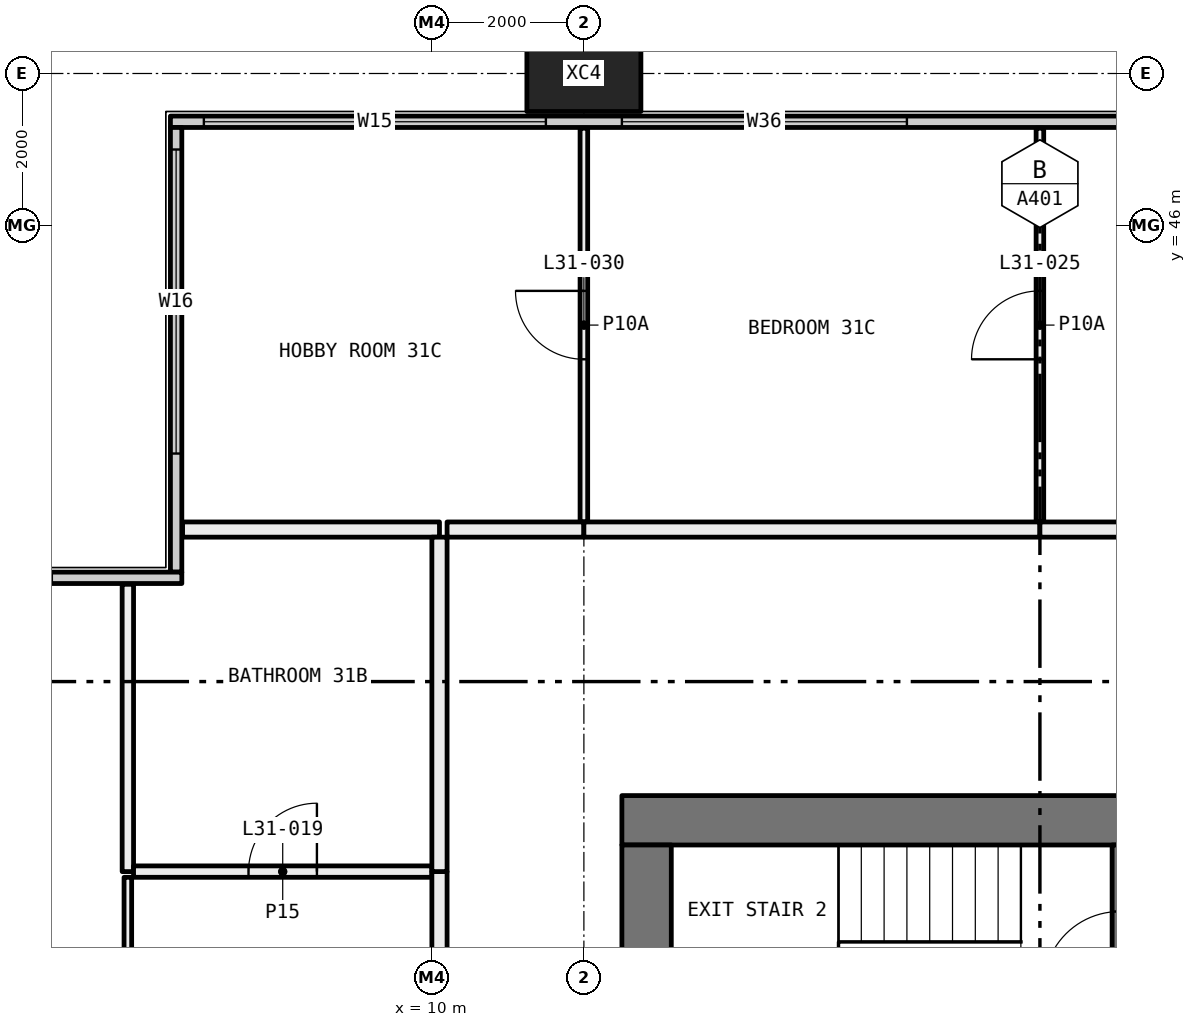
"""IFC4 building model, lengths in metres.
Left out: names, types, materials, properties, quantities, classifications, styles, units other than length and angle.
Written with IfcOpenShell. Run it as: python <this file> out.ifc"""

import sys

from ifc_helpers import new_model, si_unit, direction, frame, frame_2d, origin, origin_2d, place, context, subcontext, project, spatial, rectangle, hollow_rectangle, extrude, element, fill, save


model = new_model("IFC4")
c1 = context("Model", 3, precision=1e-05, world=origin(), true_north=direction((0.0, 1.0)))
c2 = subcontext(c1, "Body", "Model", "MODEL_VIEW")
j1 = project(units=[si_unit("LENGTHUNIT", "METRE"), si_unit("PLANEANGLEUNIT", "RADIAN")], contexts=[c1])
p1 = place(None, origin())
s1 = spatial("IfcSite", under=j1, at=p1, CompositionType="ELEMENT")
p2 = place(p1, origin())
s2 = spatial("IfcBuilding", under=s1, at=p2, CompositionType="ELEMENT")
p3 = place(p2, frame((0.0, 0.0, 120.75)))
s3 = spatial("IfcBuildingStorey", under=s2, at=p3, CompositionType="ELEMENT", Elevation=120.75)
p4 = place(p3, frame((12.0, 48.0, -0.4), z_axis=(0.0, 0.0, 1.0), x_axis=(1.0, 0.0, 0.0)))
e1 = element("IfcColumn", 1, at=p4, inside=s3, PredefinedType="COLUMN", context=c2, shape_type="SweptSolid", body=[
    extrude(hollow_rectangle(XDim=1.5, YDim=1.0, WallThickness=0.06, at=origin_2d()), origin(), (0.0, 0.0, 1.0), 3.45),
])
p5 = place(p3, frame((6.56, 47.365, 0.0), z_axis=(0.0, 0.0, 1.0), x_axis=(1.0, 0.0, 0.0)))
e2 = element("IfcWall", 2, at=p5, inside=s3, PredefinedType="ELEMENTEDWALL", context=c2, shape_type="SweptSolid", body=[
    extrude(rectangle(XDim=58.88, YDim=0.15, at=frame_2d((29.44, 0.0))), origin(), (0.0, 0.0, 1.0), 3.05),
])
p6 = place(p5, frame((0.44, 0.0, 0.45)))
e3 = element("IfcOpeningElement", 3, at=p6, cuts=e2, PredefinedType="OPENING", context=c2, shape_type="SweptSolid", body=[
    extrude(rectangle(XDim=4.5, YDim=2.55, at=frame_2d((2.25, 1.275))), frame((0.0, 0.085, 0.0), z_axis=(0.0, -1.0, 0.0), x_axis=(1.0, 0.0, 0.0)), (0.0, 0.0, 1.0), 0.17),
])
p7 = place(p5, frame((5.94, 0.0, 0.45)))
e4 = element("IfcOpeningElement", 4, at=p7, cuts=e2, PredefinedType="OPENING", context=c2, shape_type="SweptSolid", body=[
    extrude(rectangle(XDim=3.75, YDim=2.55, at=frame_2d((1.875, 1.275))), frame((0.0, 0.085, 0.0), z_axis=(0.0, -1.0, 0.0), x_axis=(1.0, 0.0, 0.0)), (0.0, 0.0, 1.0), 0.17),
])
p8 = place(p5, frame((13.19, 0.0, 0.45)))
e5 = element("IfcOpeningElement", 5, at=p8, cuts=e2, PredefinedType="OPENING", context=c2, shape_type="SweptSolid", body=[
    extrude(rectangle(XDim=3.75, YDim=2.55, at=frame_2d((1.875, 1.275))), frame((0.0, 0.085, 0.0), z_axis=(0.0, -1.0, 0.0), x_axis=(1.0, 0.0, 0.0)), (0.0, 0.0, 1.0), 0.17),
])
p9 = place(p5, frame((17.94, 0.0, 0.45)))
e6 = element("IfcOpeningElement", 6, at=p9, cuts=e2, PredefinedType="OPENING", context=c2, shape_type="SweptSolid", body=[
    extrude(rectangle(XDim=3.75, YDim=2.55, at=frame_2d((1.875, 1.275))), frame((0.0, 0.085, 0.0), z_axis=(0.0, -1.0, 0.0), x_axis=(1.0, 0.0, 0.0)), (0.0, 0.0, 1.0), 0.17),
])
p10 = place(p5, frame((25.19, 0.0, 0.45)))
e7 = element("IfcOpeningElement", 7, at=p10, cuts=e2, PredefinedType="OPENING", context=c2, shape_type="SweptSolid", body=[
    extrude(rectangle(XDim=0.75, YDim=2.55, at=frame_2d((0.375, 1.275))), frame((0.0, 0.085, 0.0), z_axis=(0.0, -1.0, 0.0), x_axis=(1.0, 0.0, 0.0)), (0.0, 0.0, 1.0), 0.17),
])
p11 = place(p5, frame((26.94, 0.0, 0.45)))
e8 = element("IfcOpeningElement", 8, at=p11, cuts=e2, PredefinedType="OPENING", context=c2, shape_type="SweptSolid", body=[
    extrude(rectangle(XDim=2.0, YDim=2.55, at=frame_2d((1.0, 1.275))), frame((0.0, 0.085, 0.0), z_axis=(0.0, -1.0, 0.0), x_axis=(1.0, 0.0, 0.0)), (0.0, 0.0, 1.0), 0.17),
])
p12 = place(p5, frame((29.94, 0.0, 0.45)))
e9 = element("IfcOpeningElement", 9, at=p12, cuts=e2, PredefinedType="OPENING", context=c2, shape_type="SweptSolid", body=[
    extrude(rectangle(XDim=3.75, YDim=2.55, at=frame_2d((1.875, 1.275))), frame((0.0, 0.085, 0.0), z_axis=(0.0, -1.0, 0.0), x_axis=(1.0, 0.0, 0.0)), (0.0, 0.0, 1.0), 0.17),
])
p13 = place(p5, frame((37.19, 0.0, 0.45)))
e10 = element("IfcOpeningElement", 10, at=p13, cuts=e2, PredefinedType="OPENING", context=c2, shape_type="SweptSolid", body=[
    extrude(rectangle(XDim=3.75, YDim=2.55, at=frame_2d((1.875, 1.275))), frame((0.0, 0.085, 0.0), z_axis=(0.0, -1.0, 0.0), x_axis=(1.0, 0.0, 0.0)), (0.0, 0.0, 1.0), 0.17),
])
p14 = place(p5, frame((41.94, 0.0, 0.45)))
e11 = element("IfcOpeningElement", 11, at=p14, cuts=e2, PredefinedType="OPENING", context=c2, shape_type="SweptSolid", body=[
    extrude(rectangle(XDim=3.75, YDim=2.55, at=frame_2d((1.875, 1.275))), frame((0.0, 0.085, 0.0), z_axis=(0.0, -1.0, 0.0), x_axis=(1.0, 0.0, 0.0)), (0.0, 0.0, 1.0), 0.17),
])
p15 = place(p5, frame((49.19, 0.0, 0.45)))
e12 = element("IfcOpeningElement", 12, at=p15, cuts=e2, PredefinedType="OPENING", context=c2, shape_type="SweptSolid", body=[
    extrude(rectangle(XDim=0.75, YDim=2.55, at=frame_2d((0.375, 1.275))), frame((0.0, 0.085, 0.0), z_axis=(0.0, -1.0, 0.0), x_axis=(1.0, 0.0, 0.0)), (0.0, 0.0, 1.0), 0.17),
])
p16 = place(p5, frame((50.94, 0.0, 0.45)))
e13 = element("IfcOpeningElement", 13, at=p16, cuts=e2, PredefinedType="OPENING", context=c2, shape_type="SweptSolid", body=[
    extrude(rectangle(XDim=2.0, YDim=2.55, at=frame_2d((1.0, 1.275))), frame((0.0, 0.085, 0.0), z_axis=(0.0, -1.0, 0.0), x_axis=(1.0, 0.0, 0.0)), (0.0, 0.0, 1.0), 0.17),
])
p17 = place(p5, frame((53.94, 0.0, 0.45)))
e14 = element("IfcOpeningElement", 14, at=p17, cuts=e2, PredefinedType="OPENING", context=c2, shape_type="SweptSolid", body=[
    extrude(rectangle(XDim=4.5, YDim=2.55, at=frame_2d((2.25, 1.275))), frame((0.0, 0.085, 0.0), z_axis=(0.0, -1.0, 0.0), x_axis=(1.0, 0.0, 0.0)), (0.0, 0.0, 1.0), 0.17),
])
p18 = place(p3, frame((6.635, 41.44, 0.0), z_axis=(0.0, 0.0, 1.0), x_axis=(0.0, 1.0, 0.0)))
e15 = element("IfcWall", 15, at=p18, inside=s3, PredefinedType="ELEMENTEDWALL", context=c2, shape_type="SweptSolid", body=[
    extrude(rectangle(XDim=5.85, YDim=0.15, at=frame_2d((2.925, 0.0))), origin(), (0.0, 0.0, 1.0), 3.05),
])
p19 = place(p18, frame((1.56, 0.0, 0.45)))
e16 = element("IfcOpeningElement", 16, at=p19, cuts=e15, PredefinedType="OPENING", context=c2, shape_type="SweptSolid", body=[
    extrude(rectangle(XDim=4.0, YDim=2.55, at=frame_2d((2.0, 1.275))), frame((0.0, 0.085, 0.0), z_axis=(0.0, -1.0, 0.0), x_axis=(1.0, 0.0, 0.0)), (0.0, 0.0, 1.0), 0.17),
])
p20 = place(p3, frame((0.56, 41.365, 0.0), z_axis=(0.0, 0.0, 1.0), x_axis=(1.0, 0.0, 0.0)))
e17 = element("IfcWall", 17, at=p20, inside=s3, PredefinedType="ELEMENTEDWALL", context=c2, shape_type="SweptSolid", body=[
    extrude(rectangle(XDim=6.15, YDim=0.15, at=frame_2d((3.075, 0.0))), origin(), (0.0, 0.0, 1.0), 3.05),
])
p21 = place(p20, frame((0.44, 0.0, 0.45)))
e18 = element("IfcOpeningElement", 18, at=p21, cuts=e17, PredefinedType="OPENING", context=c2, shape_type="SweptSolid", body=[
    extrude(rectangle(XDim=4.0, YDim=2.55, at=frame_2d((2.0, 1.275))), frame((0.0, 0.085, 0.0), z_axis=(0.0, -1.0, 0.0), x_axis=(1.0, 0.0, 0.0)), (0.0, 0.0, 1.0), 0.17),
])
p22 = place(p3, frame((6.0, 36.05, 0.0), z_axis=(0.0, 0.0, 1.0), x_axis=(0.0, 1.0, 0.0)))
e19 = element("IfcWall", 19, at=p22, inside=s3, PredefinedType="PARTITIONING", context=c2, shape_type="SweptSolid", body=[
    extrude(rectangle(XDim=1.375, YDim=0.1, at=frame_2d((0.688, 0.0))), origin(), (0.0, 0.0, 1.0), 2.45),
])
p23 = place(p3, frame((6.0, 37.5, 0.0), z_axis=(0.0, 0.0, 1.0), x_axis=(0.0, 1.0, 0.0)))
e20 = element("IfcWall", 20, at=p23, inside=s3, PredefinedType="PARTITIONING", context=c2, shape_type="SweptSolid", body=[
    extrude(rectangle(XDim=3.78, YDim=0.15, at=frame_2d((1.89, 0.0))), origin(), (0.0, 0.0, 1.0), 3.05),
])
p24 = place(p3, frame((10.0, 37.5, 0.0), z_axis=(0.0, 0.0, 1.0), x_axis=(-1.0, 0.0, 0.0)))
e21 = element("IfcWall", 21, at=p24, inside=s3, PredefinedType="PARTITIONING", context=c2, shape_type="SweptSolid", body=[
    extrude(rectangle(XDim=3.925, YDim=0.15, at=frame_2d((1.962, 0.0))), origin(), (0.0, 0.0, 1.0), 3.05),
])
p25 = place(p24, frame((1.512, 0.0, 0.0)))
e22 = element("IfcOpeningElement", 22, at=p25, cuts=e21, PredefinedType="OPENING", context=c2, shape_type="SweptSolid", body=[
    extrude(rectangle(XDim=0.9, YDim=2.1, at=frame_2d((0.45, 1.05))), frame((0.0, 0.085, 0.0), z_axis=(0.0, -1.0, 0.0), x_axis=(1.0, 0.0, 0.0)), (0.0, 0.0, 1.0), 0.17),
])
p26 = place(p3, frame((10.1, 36.1, 0.0), z_axis=(0.0, 0.0, 1.0), x_axis=(0.0, 1.0, 0.0)))
e23 = element("IfcWall", 23, at=p26, inside=s3, PredefinedType="PARTITIONING", context=c2, shape_type="SweptSolid", body=[
    extrude(rectangle(XDim=1.4, YDim=0.2, at=frame_2d((0.7, 0.0))), origin(), (0.0, 0.0, 1.0), 3.05),
])
p27 = place(p3, frame((10.1, 42.0, 0.0), z_axis=(0.0, 0.0, 1.0), x_axis=(-1.0, 0.0, 0.0)))
e24 = element("IfcWall", 24, at=p27, inside=s3, PredefinedType="PARTITIONING", context=c2, shape_type="SweptSolid", body=[
    extrude(rectangle(XDim=3.38, YDim=0.2, at=frame_2d((1.69, 0.0))), origin(), (0.0, 0.0, 1.0), 3.05),
])
p28 = place(p3, frame((10.1, 37.5, 0.0), z_axis=(0.0, 0.0, 1.0), x_axis=(0.0, 1.0, 0.0)))
e25 = element("IfcWall", 25, at=p28, inside=s3, PredefinedType="PARTITIONING", context=c2, shape_type="SweptSolid", body=[
    extrude(rectangle(XDim=4.4, YDim=0.2, at=frame_2d((2.2, 0.0))), origin(), (0.0, 0.0, 1.0), 3.05),
])
p29 = place(p3, frame((12.0, 42.1, 0.0), z_axis=(0.0, 0.0, 1.0), x_axis=(0.0, 1.0, 0.0)))
e26 = element("IfcWall", 26, at=p29, inside=s3, PredefinedType="PARTITIONING", context=c2, shape_type="SweptSolid", body=[
    extrude(rectangle(XDim=5.18, YDim=0.1, at=frame_2d((2.59, 0.0))), origin(), (0.0, 0.0, 1.0), 3.05),
])
p30 = place(p29, frame((2.14, 0.0, 0.0)))
e27 = element("IfcOpeningElement", 27, at=p30, cuts=e26, PredefinedType="OPENING", context=c2, shape_type="SweptSolid", body=[
    extrude(rectangle(XDim=0.9, YDim=2.1, at=frame_2d((0.45, 1.05))), frame((0.0, 0.06, 0.0), z_axis=(0.0, -1.0, 0.0), x_axis=(1.0, 0.0, 0.0)), (0.0, 0.0, 1.0), 0.12),
])
p31 = place(p3, frame((10.2, 42.0, 0.0), z_axis=(0.0, 0.0, 1.0), x_axis=(1.0, 0.0, 0.0)))
e28 = element("IfcWall", 28, at=p31, inside=s3, PredefinedType="PARTITIONING", context=c2, shape_type="SweptSolid", body=[
    extrude(rectangle(XDim=1.8, YDim=0.2, at=frame_2d((0.9, 0.0))), origin(), (0.0, 0.0, 1.0), 3.05),
])
p32 = place(p3, frame((18.0, 42.1, 0.0), z_axis=(0.0, 0.0, 1.0), x_axis=(0.0, 1.0, 0.0)))
e29 = element("IfcWall", 29, at=p32, inside=s3, PredefinedType="PARTITIONING", context=c2, shape_type="SweptSolid", body=[
    extrude(rectangle(XDim=5.18, YDim=0.1, at=frame_2d((2.59, 0.0))), origin(), (0.0, 0.0, 1.0), 3.05),
])
p33 = place(p32, frame((2.14, 0.0, 0.0)))
e30 = element("IfcOpeningElement", 30, at=p33, cuts=e29, PredefinedType="OPENING", context=c2, shape_type="SweptSolid", body=[
    extrude(rectangle(XDim=0.9, YDim=2.1, at=frame_2d((0.45, 1.05))), frame((0.0, 0.06, 0.0), z_axis=(0.0, -1.0, 0.0), x_axis=(1.0, 0.0, 0.0)), (0.0, 0.0, 1.0), 0.12),
])
p34 = place(p3, frame((12.0, 42.0, 0.0), z_axis=(0.0, 0.0, 1.0), x_axis=(1.0, 0.0, 0.0)))
e31 = element("IfcWall", 31, at=p34, inside=s3, PredefinedType="PARTITIONING", context=c2, shape_type="SweptSolid", body=[
    extrude(rectangle(XDim=6.0, YDim=0.2, at=frame_2d((3.0, 0.0))), origin(), (0.0, 0.0, 1.0), 3.05),
])
p35 = place(p3, frame((18.0, 42.0, 0.0), z_axis=(0.0, 0.0, 1.0), x_axis=(1.0, 0.0, 0.0)))
e32 = element("IfcWall", 32, at=p35, inside=s3, PredefinedType="PARTITIONING", context=c2, shape_type="SweptSolid", body=[
    extrude(rectangle(XDim=6.0, YDim=0.2, at=frame_2d((3.0, 0.0))), origin(), (0.0, 0.0, 1.0), 3.05),
])
p36 = place(p35, frame((2.5, 0.0, 0.0)))
e33 = element("IfcOpeningElement", 33, at=p36, cuts=e32, PredefinedType="OPENING", context=c2, shape_type="SweptSolid", body=[
    extrude(rectangle(XDim=1.0, YDim=2.1, at=frame_2d((0.5, 1.05))), frame((0.0, 0.11, 0.0), z_axis=(0.0, -1.0, 0.0), x_axis=(1.0, 0.0, 0.0)), (0.0, 0.0, 1.0), 0.22),
])
p37 = place(p3, frame((12.5, 38.175, 0.0), z_axis=(0.0, 0.0, 1.0), x_axis=(1.0, 0.0, 0.0)))
e34 = element("IfcWall", 34, at=p37, inside=s3, PredefinedType="SHEAR", context=c2, shape_type="SweptSolid", body=[
    extrude(rectangle(XDim=11.0, YDim=0.65, at=frame_2d((5.5, 0.0))), origin(), (0.0, 0.0, 1.0), 3.05),
])
p38 = place(p37, frame((8.475, 0.0, 0.0)))
e35 = element("IfcOpeningElement", 35, at=p38, cuts=e34, PredefinedType="OPENING", context=c2, shape_type="SweptSolid", body=[
    extrude(rectangle(XDim=1.6, YDim=2.1, at=frame_2d((0.8, 1.05))), frame((0.0, 0.335, 0.0), z_axis=(0.0, -1.0, 0.0), x_axis=(1.0, 0.0, 0.0)), (0.0, 0.0, 1.0), 0.67),
])
p39 = place(p3, frame((12.825, 22.15, 0.0), z_axis=(0.0, 0.0, 1.0), x_axis=(0.0, 1.0, 0.0)))
e36 = element("IfcWall", 36, at=p39, inside=s3, PredefinedType="SHEAR", context=c2, shape_type="SweptSolid", body=[
    extrude(rectangle(XDim=15.7, YDim=0.65, at=frame_2d((7.85, 0.0))), origin(), (0.0, 0.0, 1.0), 3.05),
])
p40 = place(p39, frame((8.3, 0.0, 0.0)))
e37 = element("IfcOpeningElement", 37, at=p40, cuts=e36, PredefinedType="OPENING", context=c2, shape_type="SweptSolid", body=[
    extrude(rectangle(XDim=1.6, YDim=2.1, at=frame_2d((0.8, 1.05))), frame((0.0, 0.335, 0.0), z_axis=(0.0, -1.0, 0.0), x_axis=(1.0, 0.0, 0.0)), (0.0, 0.0, 1.0), 0.67),
])
p41 = place(p39, frame((2.125, 0.0, 0.0)))
e38 = element("IfcOpeningElement", 38, at=p41, cuts=e36, PredefinedType="OPENING", context=c2, shape_type="SweptSolid", body=[
    extrude(rectangle(XDim=1.0, YDim=2.1, at=frame_2d((0.5, 1.05))), frame((0.0, 0.335, 0.0), z_axis=(0.0, -1.0, 0.0), x_axis=(1.0, 0.0, 0.0)), (0.0, 0.0, 1.0), 0.67),
])
p42 = place(p3, frame((19.05, 35.1, 0.0), z_axis=(0.0, 0.0, 1.0), x_axis=(0.0, 1.0, 0.0)))
e39 = element("IfcWall", 39, at=p42, inside=s3, PredefinedType="SOLIDWALL", context=c2, shape_type="SweptSolid", body=[
    extrude(rectangle(XDim=2.75, YDim=0.2, at=frame_2d((1.375, 0.0))), origin(), (0.0, 0.0, 1.0), 3.05),
])
p43 = place(p42, frame((0.875, 0.0, 0.0)))
e40 = element("IfcOpeningElement", 40, at=p43, cuts=e39, PredefinedType="OPENING", context=c2, shape_type="SweptSolid", body=[
    extrude(rectangle(XDim=1.0, YDim=2.1, at=frame_2d((0.5, 1.05))), frame((0.0, 0.11, 0.0), z_axis=(0.0, -1.0, 0.0), x_axis=(1.0, 0.0, 0.0)), (0.0, 0.0, 1.0), 0.22),
])
p44 = place(p6, origin())
e41 = element("IfcWindow", 41, at=p44, inside=s3, PartitioningType="SINGLE_PANEL", PredefinedType="WINDOW", context=c2, shape_type="SweptSolid", body=[
    extrude(rectangle(XDim=4.5, YDim=2.55, at=frame_2d((2.25, 1.275))), frame((0.0, 0.03, 0.0), z_axis=(0.0, -1.0, 0.0), x_axis=(1.0, 0.0, 0.0)), (0.0, 0.0, 1.0), 0.06),
])
fill(e3, e41)
p45 = place(p7, origin())
e42 = element("IfcWindow", 42, at=p45, inside=s3, PartitioningType="SINGLE_PANEL", PredefinedType="WINDOW", context=c2, shape_type="SweptSolid", body=[
    extrude(rectangle(XDim=3.75, YDim=2.55, at=frame_2d((1.875, 1.275))), frame((0.0, 0.03, 0.0), z_axis=(0.0, -1.0, 0.0), x_axis=(1.0, 0.0, 0.0)), (0.0, 0.0, 1.0), 0.06),
])
fill(e4, e42)
p46 = place(p19, origin())
e43 = element("IfcWindow", 43, at=p46, inside=s3, PartitioningType="SINGLE_PANEL", PredefinedType="WINDOW", context=c2, shape_type="SweptSolid", body=[
    extrude(rectangle(XDim=4.0, YDim=2.55, at=frame_2d((2.0, 1.275))), frame((0.0, 0.03, 0.0), z_axis=(0.0, -1.0, 0.0), x_axis=(1.0, 0.0, 0.0)), (0.0, 0.0, 1.0), 0.06),
])
fill(e16, e43)
p47 = place(p25, frame((0.9, 0.0, 0.0), x_axis=(-1.0, 0.0, 0.0)))
e44 = element("IfcDoor", 44, at=p47, inside=s3, OperationType="SINGLE_SWING_LEFT", PredefinedType="DOOR", context=c2, shape_type="SweptSolid", body=[
    extrude(rectangle(XDim=0.9, YDim=2.1, at=frame_2d((0.45, 1.05))), frame((0.0, 0.025, 0.0), z_axis=(0.0, -1.0, 0.0), x_axis=(1.0, 0.0, 0.0)), (0.0, 0.0, 1.0), 0.05),
])
fill(e22, e44)
p48 = place(p33, origin())
e45 = element("IfcDoor", 45, at=p48, inside=s3, OperationType="SINGLE_SWING_RIGHT", PredefinedType="DOOR", context=c2, shape_type="SweptSolid", body=[
    extrude(rectangle(XDim=0.9, YDim=2.1, at=frame_2d((0.45, 1.05))), frame((0.0, 0.025, 0.0), z_axis=(0.0, -1.0, 0.0), x_axis=(1.0, 0.0, 0.0)), (0.0, 0.0, 1.0), 0.05),
])
fill(e30, e45)
p49 = place(p30, origin())
e46 = element("IfcDoor", 46, at=p49, inside=s3, OperationType="SINGLE_SWING_LEFT", PredefinedType="DOOR", context=c2, shape_type="SweptSolid", body=[
    extrude(rectangle(XDim=0.9, YDim=2.1, at=frame_2d((0.45, 1.05))), frame((0.0, 0.025, 0.0), z_axis=(0.0, -1.0, 0.0), x_axis=(1.0, 0.0, 0.0)), (0.0, 0.0, 1.0), 0.05),
])
fill(e27, e46)
save(model, sys.argv[1])
